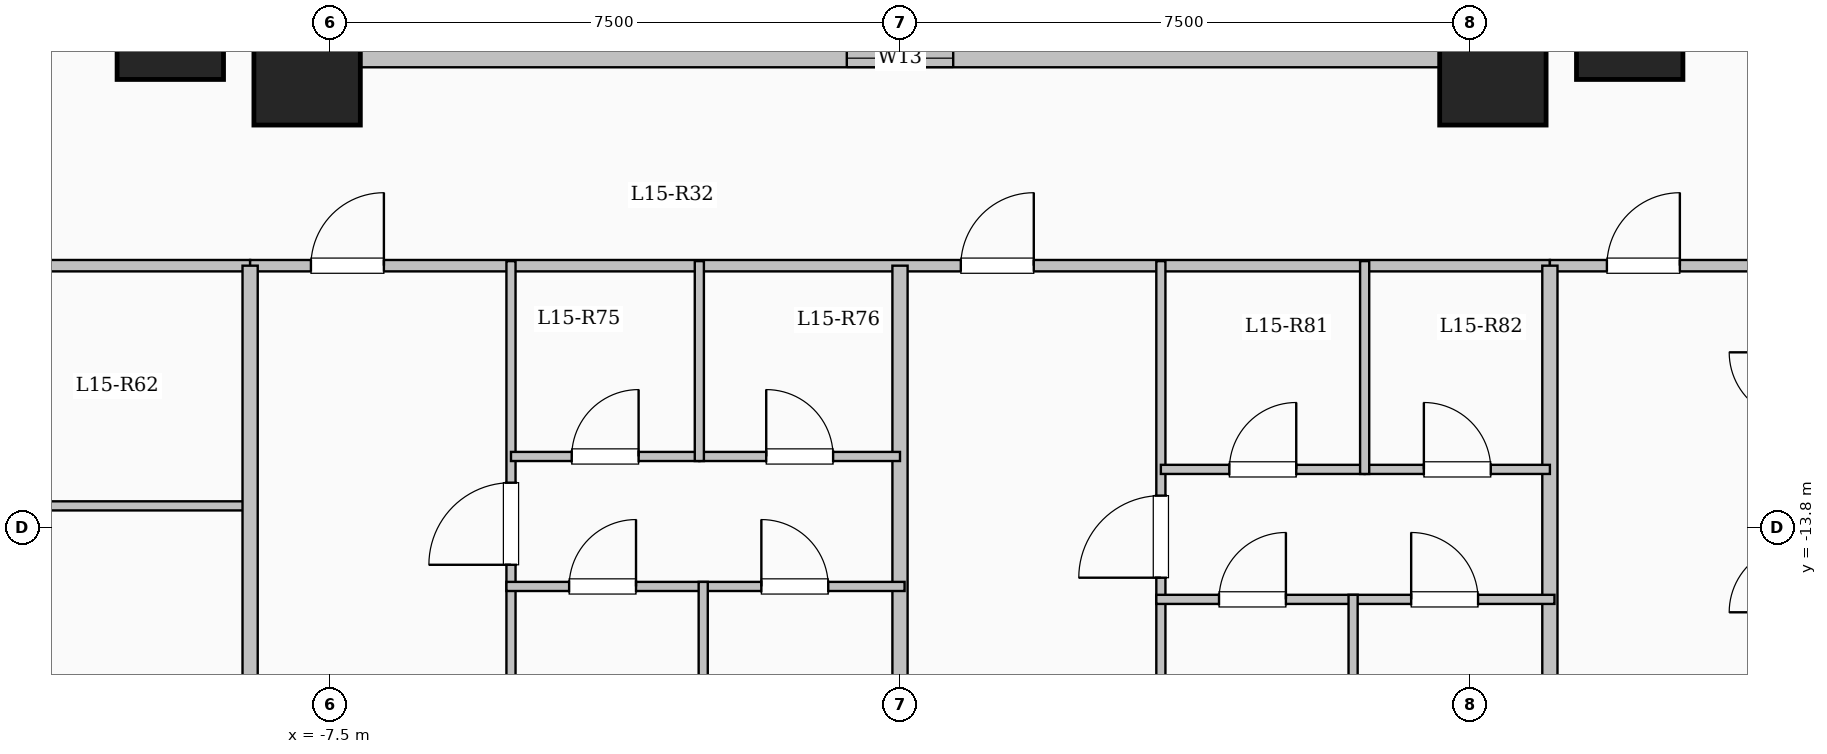
"""IFC4 building model, lengths in metres.
Left out: names, types, materials, properties, quantities, classifications, styles, units other than length and angle.
Written with IfcOpenShell. Run it as: python <this file> out.ifc"""

import sys

from ifc_helpers import new_model, si_unit, direction, frame, frame_2d, origin, origin_2d, place, context, subcontext, project, spatial, rectangle, extrude, element, fill, save


model = new_model("IFC4")
c1 = context("Model", 3, precision=1e-05, world=origin(), true_north=direction((0.0, 1.0)))
c2 = subcontext(c1, "Body", "Model", "MODEL_VIEW")
j1 = project(units=[si_unit("LENGTHUNIT", "METRE"), si_unit("PLANEANGLEUNIT", "RADIAN")], contexts=[c1])
p1 = place(None, origin())
s1 = spatial("IfcSite", under=j1, at=p1, CompositionType="ELEMENT")
p2 = place(p1, origin())
s2 = spatial("IfcBuilding", under=s1, at=p2, CompositionType="ELEMENT")
p3 = place(p2, frame((0.0, 0.0, 57.5)))
s3 = spatial("IfcBuildingStorey", under=s2, at=p3, CompositionType="ELEMENT", Elevation=57.5)
for number, where, z_axis, x_axis in (
    (1, (-7.8, -7.8, 0.0), (0.0, 0.0, 1.0), (1.0, 0.0, 0.0)),
    (2, (7.8, -7.8, 0.0), (0.0, 0.0, 1.0), (1.0, 0.0, 0.0)),
    (3, (-9.6, -7.2, 0.0), (0.0, 0.0, 1.0), (1.0, 0.0, 0.0)),
    (4, (9.6, -7.2, 0.0), (0.0, 0.0, 1.0), (1.0, 0.0, 0.0)),
):
    element("IfcColumn", number, at=place(p3, frame(where, z_axis=z_axis, x_axis=x_axis)), inside=s3, PredefinedType="COLUMN", context=c2, shape_type="SweptSolid", body=[
        extrude(rectangle(XDim=1.4, YDim=1.4, at=origin_2d()), origin(), (0.0, 0.0, 1.0), 3.35),
    ])
p4 = place(p3, frame((-7.62, -7.62, 0.0), z_axis=(0.0, 0.0, 1.0), x_axis=(1.0, 0.0, 0.0)))
e5 = element("IfcWall", 5, at=p4, inside=s3, PredefinedType="SOLIDWALL", context=c2, shape_type="SweptSolid", body=[
    extrude(rectangle(XDim=15.24, YDim=0.24, at=frame_2d((7.62, 0.0))), origin(), (0.0, 0.0, 1.0), 3.1),
])
p5 = place(p4, frame((6.92, 0.0, 0.95)))
e6 = element("IfcOpeningElement", 6, at=p5, cuts=e5, PredefinedType="OPENING", context=c2, shape_type="SweptSolid", body=[
    extrude(rectangle(XDim=1.4, YDim=1.5, at=frame_2d((0.7, 0.75))), frame((0.0, 0.13, 0.0), z_axis=(0.0, -1.0, 0.0), x_axis=(1.0, 0.0, 0.0)), (0.0, 0.0, 1.0), 0.26),
])
p6 = place(p3, frame((7.62, -7.62, 0.0), z_axis=(0.0, 0.0, 1.0), x_axis=(0.0, 1.0, 0.0)))
e7 = element("IfcWall", 7, at=p6, inside=s3, PredefinedType="SOLIDWALL", context=c2, shape_type="SweptSolid", body=[
    extrude(rectangle(XDim=15.24, YDim=0.24, at=frame_2d((7.62, 0.0))), origin(), (0.0, 0.0, 1.0), 3.1),
])
p7 = place(p6, frame((6.92, 0.0, 0.95)))
e8 = element("IfcOpeningElement", 8, at=p7, cuts=e7, PredefinedType="OPENING", context=c2, shape_type="SweptSolid", body=[
    extrude(rectangle(XDim=1.4, YDim=1.5, at=frame_2d((0.7, 0.75))), frame((0.0, 0.13, 0.0), z_axis=(0.0, -1.0, 0.0), x_axis=(1.0, 0.0, 0.0)), (0.0, 0.0, 1.0), 0.26),
])
p8 = place(p3, frame((-7.62, 7.62, 0.0), z_axis=(0.0, 0.0, 1.0), x_axis=(0.0, -1.0, 0.0)))
e9 = element("IfcWall", 9, at=p8, inside=s3, PredefinedType="SOLIDWALL", context=c2, shape_type="SweptSolid", body=[
    extrude(rectangle(XDim=15.24, YDim=0.24, at=frame_2d((7.62, 0.0))), origin(), (0.0, 0.0, 1.0), 3.1),
])
p9 = place(p8, frame((6.92, 0.0, 0.95)))
e10 = element("IfcOpeningElement", 10, at=p9, cuts=e9, PredefinedType="OPENING", context=c2, shape_type="SweptSolid", body=[
    extrude(rectangle(XDim=1.4, YDim=1.5, at=frame_2d((0.7, 0.75))), frame((0.0, 0.13, 0.0), z_axis=(0.0, -1.0, 0.0), x_axis=(1.0, 0.0, 0.0)), (0.0, 0.0, 1.0), 0.26),
])
p10 = place(p3, frame((-22.55, -10.35, 0.0), z_axis=(0.0, 0.0, 1.0), x_axis=(1.0, 0.0, 0.0)))
e11 = element("IfcWall", 11, at=p10, inside=s3, PredefinedType="PARTITIONING", context=c2, shape_type="SweptSolid", body=[
    extrude(rectangle(XDim=14.0, YDim=0.15, at=frame_2d((7.0, 0.0))), origin(), (0.0, 0.0, 1.0), 3.1),
])
p11 = place(p10, frame((0.7, 0.0, 0.0)))
e12 = element("IfcOpeningElement", 12, at=p11, cuts=e11, PredefinedType="OPENING", context=c2, shape_type="SweptSolid", body=[
    extrude(rectangle(XDim=0.96, YDim=2.15, at=frame_2d((0.48, 1.075))), frame((0.0, 0.085, 0.0), z_axis=(0.0, -1.0, 0.0), x_axis=(1.0, 0.0, 0.0)), (0.0, 0.0, 1.0), 0.17),
])
p12 = place(p10, frame((7.396, 0.0, 0.0)))
e13 = element("IfcOpeningElement", 13, at=p12, cuts=e11, PredefinedType="OPENING", context=c2, shape_type="SweptSolid", body=[
    extrude(rectangle(XDim=0.96, YDim=2.15, at=frame_2d((0.48, 1.075))), frame((0.0, 0.085, 0.0), z_axis=(0.0, -1.0, 0.0), x_axis=(1.0, 0.0, 0.0)), (0.0, 0.0, 1.0), 0.17),
])
p13 = place(p3, frame((-8.55, -10.35, 0.0), z_axis=(0.0, 0.0, 1.0), x_axis=(1.0, 0.0, 0.0)))
e14 = element("IfcWall", 14, at=p13, inside=s3, PredefinedType="PARTITIONING", context=c2, shape_type="SweptSolid", body=[
    extrude(rectangle(XDim=17.1, YDim=0.15, at=frame_2d((8.55, 0.0))), origin(), (0.0, 0.0, 1.0), 3.1),
])
p14 = place(p13, frame((0.8, 0.0, 0.0)))
e15 = element("IfcOpeningElement", 15, at=p14, cuts=e14, PredefinedType="OPENING", context=c2, shape_type="SweptSolid", body=[
    extrude(rectangle(XDim=0.96, YDim=2.15, at=frame_2d((0.48, 1.075))), frame((0.0, 0.085, 0.0), z_axis=(0.0, -1.0, 0.0), x_axis=(1.0, 0.0, 0.0)), (0.0, 0.0, 1.0), 0.17),
])
p15 = place(p13, frame((9.35, 0.0, 0.0)))
e16 = element("IfcOpeningElement", 16, at=p15, cuts=e14, PredefinedType="OPENING", context=c2, shape_type="SweptSolid", body=[
    extrude(rectangle(XDim=0.96, YDim=2.15, at=frame_2d((0.48, 1.075))), frame((0.0, 0.085, 0.0), z_axis=(0.0, -1.0, 0.0), x_axis=(1.0, 0.0, 0.0)), (0.0, 0.0, 1.0), 0.17),
])
p16 = place(p3, frame((8.55, -10.35, 0.0), z_axis=(0.0, 0.0, 1.0), x_axis=(1.0, 0.0, 0.0)))
e17 = element("IfcWall", 17, at=p16, inside=s3, PredefinedType="PARTITIONING", context=c2, shape_type="SweptSolid", body=[
    extrude(rectangle(XDim=14.0, YDim=0.15, at=frame_2d((7.0, 0.0))), origin(), (0.0, 0.0, 1.0), 3.1),
])
p17 = place(p16, frame((0.75, 0.0, 0.0)))
e18 = element("IfcOpeningElement", 18, at=p17, cuts=e17, PredefinedType="OPENING", context=c2, shape_type="SweptSolid", body=[
    extrude(rectangle(XDim=0.96, YDim=2.15, at=frame_2d((0.48, 1.075))), frame((0.0, 0.085, 0.0), z_axis=(0.0, -1.0, 0.0), x_axis=(1.0, 0.0, 0.0)), (0.0, 0.0, 1.0), 0.17),
])
p18 = place(p16, frame((6.888, 0.0, 0.0)))
e19 = element("IfcOpeningElement", 19, at=p18, cuts=e17, PredefinedType="OPENING", context=c2, shape_type="SweptSolid", body=[
    extrude(rectangle(XDim=0.96, YDim=2.15, at=frame_2d((0.48, 1.075))), frame((0.0, 0.085, 0.0), z_axis=(0.0, -1.0, 0.0), x_axis=(1.0, 0.0, 0.0)), (0.0, 0.0, 1.0), 0.17),
])
p19 = place(p3, frame((-12.144, -13.51, 0.0), z_axis=(0.0, 0.0, 1.0), x_axis=(1.0, 0.0, 0.0)))
e20 = element("IfcWall", 20, at=p19, inside=s3, PredefinedType="PARTITIONING", context=c2, shape_type="SweptSolid", body=[
    extrude(rectangle(XDim=3.604, YDim=0.12, at=frame_2d((1.802, 0.0))), origin(), (0.0, 0.0, 1.0), 3.1),
])
for number, where, z_axis, x_axis in (
    (21, (-8.55, -24.204, 0.0), (0.0, 0.0, 1.0), (0.0, 1.0, 0.0)),
    (22, (8.55, -24.204, 0.0), (0.0, 0.0, 1.0), (0.0, 1.0, 0.0)),
):
    element("IfcWall", number, at=place(p3, frame(where, z_axis=z_axis, x_axis=x_axis)), inside=s3, PredefinedType="SOLIDWALL", context=c2, shape_type="SweptSolid", body=[
        extrude(rectangle(XDim=13.854, YDim=0.2, at=frame_2d((6.927, 0.0))), origin(), (0.0, 0.0, 1.0), 3.1),
    ])
p20 = place(p3, frame((0.0, -25.08, 0.0), z_axis=(0.0, 0.0, 1.0), x_axis=(0.0, 1.0, 0.0)))
e23 = element("IfcWall", 23, at=p20, inside=s3, PredefinedType="SOLIDWALL", context=c2, shape_type="SweptSolid", body=[
    extrude(rectangle(XDim=14.73, YDim=0.2, at=frame_2d((7.365, 0.0))), origin(), (0.0, 0.0, 1.0), 3.1),
])
p21 = place(p3, frame((-5.118, -25.051, 0.0), z_axis=(0.0, 0.0, 1.0), x_axis=(0.0, 1.0, 0.0)))
e24 = element("IfcWall", 24, at=p21, inside=s3, PredefinedType="PARTITIONING", context=c2, shape_type="SweptSolid", body=[
    extrude(rectangle(XDim=14.761, YDim=0.12, at=frame_2d((7.38, 0.0))), origin(), (0.0, 0.0, 1.0), 3.1),
])
p22 = place(p21, frame((10.766, 0.0, 0.0)))
e25 = element("IfcOpeningElement", 25, at=p22, cuts=e24, PredefinedType="OPENING", context=c2, shape_type="SweptSolid", body=[
    extrude(rectangle(XDim=1.08, YDim=2.15, at=frame_2d((0.54, 1.075))), frame((0.0, 0.07, 0.0), z_axis=(0.0, -1.0, 0.0), x_axis=(1.0, 0.0, 0.0)), (0.0, 0.0, 1.0), 0.14),
])
p23 = place(p3, frame((-5.118, -12.86, 0.0), z_axis=(0.0, 0.0, 1.0), x_axis=(1.0, 0.0, 0.0)))
e26 = element("IfcWall", 26, at=p23, inside=s3, PredefinedType="PARTITIONING", context=c2, shape_type="SweptSolid", body=[
    extrude(rectangle(XDim=2.478, YDim=0.12, at=frame_2d((1.239, 0.0))), origin(), (0.0, 0.0, 1.0), 2.585),
])
p24 = place(p23, frame((0.799, 0.0, 0.0)))
e27 = element("IfcOpeningElement", 27, at=p24, cuts=e26, PredefinedType="OPENING", context=c2, shape_type="SweptSolid", body=[
    extrude(rectangle(XDim=0.88, YDim=2.1, at=frame_2d((0.44, 1.05))), frame((0.0, 0.07, 0.0), z_axis=(0.0, -1.0, 0.0), x_axis=(1.0, 0.0, 0.0)), (0.0, 0.0, 1.0), 0.14),
])
p25 = place(p3, frame((-2.64, -12.86, 0.0), z_axis=(0.0, 0.0, 1.0), x_axis=(1.0, 0.0, 0.0)))
e28 = element("IfcWall", 28, at=p25, inside=s3, PredefinedType="PARTITIONING", context=c2, shape_type="SweptSolid", body=[
    extrude(rectangle(XDim=2.64, YDim=0.12, at=frame_2d((1.32, 0.0))), origin(), (0.0, 0.0, 1.0), 2.585),
])
p26 = place(p25, frame((0.88, 0.0, 0.0)))
e29 = element("IfcOpeningElement", 29, at=p26, cuts=e28, PredefinedType="OPENING", context=c2, shape_type="SweptSolid", body=[
    extrude(rectangle(XDim=0.88, YDim=2.1, at=frame_2d((0.44, 1.05))), frame((0.0, 0.07, 0.0), z_axis=(0.0, -1.0, 0.0), x_axis=(1.0, 0.0, 0.0)), (0.0, 0.0, 1.0), 0.14),
])
p27 = place(p3, frame((-5.178, -14.57, 0.0), z_axis=(0.0, 0.0, 1.0), x_axis=(1.0, 0.0, 0.0)))
e30 = element("IfcWall", 30, at=p27, inside=s3, PredefinedType="PARTITIONING", context=c2, shape_type="SweptSolid", body=[
    extrude(rectangle(XDim=5.238, YDim=0.12, at=frame_2d((2.619, 0.0))), origin(), (0.0, 0.0, 1.0), 3.1),
])
p28 = place(p27, frame((0.825, 0.0, 0.0)))
e31 = element("IfcOpeningElement", 31, at=p28, cuts=e30, PredefinedType="OPENING", context=c2, shape_type="SweptSolid", body=[
    extrude(rectangle(XDim=0.88, YDim=2.1, at=frame_2d((0.44, 1.05))), frame((0.0, 0.07, 0.0), z_axis=(0.0, -1.0, 0.0), x_axis=(1.0, 0.0, 0.0)), (0.0, 0.0, 1.0), 0.14),
])
p29 = place(p27, frame((3.354, 0.0, 0.0)))
e32 = element("IfcOpeningElement", 32, at=p29, cuts=e30, PredefinedType="OPENING", context=c2, shape_type="SweptSolid", body=[
    extrude(rectangle(XDim=0.88, YDim=2.1, at=frame_2d((0.44, 1.05))), frame((0.0, 0.07, 0.0), z_axis=(0.0, -1.0, 0.0), x_axis=(1.0, 0.0, 0.0)), (0.0, 0.0, 1.0), 0.14),
])
p30 = place(p3, frame((-2.64, -12.92, 0.0), z_axis=(0.0, 0.0, 1.0), x_axis=(0.0, 1.0, 0.0)))
e33 = element("IfcWall", 33, at=p30, inside=s3, PredefinedType="PARTITIONING", context=c2, shape_type="SweptSolid", body=[
    extrude(rectangle(XDim=2.63, YDim=0.12, at=frame_2d((1.315, 0.0))), origin(), (0.0, 0.0, 1.0), 3.1),
])
p31 = place(p3, frame((-2.589, -25.08, 0.0), z_axis=(0.0, 0.0, 1.0), x_axis=(0.0, 1.0, 0.0)))
e34 = element("IfcWall", 34, at=p31, inside=s3, PredefinedType="PARTITIONING", context=c2, shape_type="SweptSolid", body=[
    extrude(rectangle(XDim=10.57, YDim=0.12, at=frame_2d((5.285, 0.0))), origin(), (0.0, 0.0, 1.0), 3.1),
])
p32 = place(p3, frame((3.432, -25.08, 0.0), z_axis=(0.0, 0.0, 1.0), x_axis=(0.0, 1.0, 0.0)))
e35 = element("IfcWall", 35, at=p32, inside=s3, PredefinedType="PARTITIONING", context=c2, shape_type="SweptSolid", body=[
    extrude(rectangle(XDim=14.79, YDim=0.12, at=frame_2d((7.395, 0.0))), origin(), (0.0, 0.0, 1.0), 3.1),
])
p33 = place(p32, frame((10.625, 0.0, 0.0)))
e36 = element("IfcOpeningElement", 36, at=p33, cuts=e35, PredefinedType="OPENING", context=c2, shape_type="SweptSolid", body=[
    extrude(rectangle(XDim=1.08, YDim=2.15, at=frame_2d((0.54, 1.075))), frame((0.0, 0.07, 0.0), z_axis=(0.0, -1.0, 0.0), x_axis=(1.0, 0.0, 0.0)), (0.0, 0.0, 1.0), 0.14),
])
p34 = place(p3, frame((3.432, -13.03, 0.0), z_axis=(0.0, 0.0, 1.0), x_axis=(1.0, 0.0, 0.0)))
e37 = element("IfcWall", 37, at=p34, inside=s3, PredefinedType="PARTITIONING", context=c2, shape_type="SweptSolid", body=[
    extrude(rectangle(XDim=2.681, YDim=0.12, at=frame_2d((1.341, 0.0))), origin(), (0.0, 0.0, 1.0), 2.585),
])
p35 = place(p34, frame((0.901, 0.0, 0.0)))
e38 = element("IfcOpeningElement", 38, at=p35, cuts=e37, PredefinedType="OPENING", context=c2, shape_type="SweptSolid", body=[
    extrude(rectangle(XDim=0.88, YDim=2.1, at=frame_2d((0.44, 1.05))), frame((0.0, 0.07, 0.0), z_axis=(0.0, -1.0, 0.0), x_axis=(1.0, 0.0, 0.0)), (0.0, 0.0, 1.0), 0.14),
])
p36 = place(p3, frame((6.113, -13.03, 0.0), z_axis=(0.0, 0.0, 1.0), x_axis=(1.0, 0.0, 0.0)))
e39 = element("IfcWall", 39, at=p36, inside=s3, PredefinedType="PARTITIONING", context=c2, shape_type="SweptSolid", body=[
    extrude(rectangle(XDim=2.437, YDim=0.12, at=frame_2d((1.219, 0.0))), origin(), (0.0, 0.0, 1.0), 2.585),
])
p37 = place(p36, frame((0.779, 0.0, 0.0)))
e40 = element("IfcOpeningElement", 40, at=p37, cuts=e39, PredefinedType="OPENING", context=c2, shape_type="SweptSolid", body=[
    extrude(rectangle(XDim=0.88, YDim=2.1, at=frame_2d((0.44, 1.05))), frame((0.0, 0.07, 0.0), z_axis=(0.0, -1.0, 0.0), x_axis=(1.0, 0.0, 0.0)), (0.0, 0.0, 1.0), 0.14),
])
p38 = place(p3, frame((3.372, -14.74, 0.0), z_axis=(0.0, 0.0, 1.0), x_axis=(1.0, 0.0, 0.0)))
e41 = element("IfcWall", 41, at=p38, inside=s3, PredefinedType="PARTITIONING", context=c2, shape_type="SweptSolid", body=[
    extrude(rectangle(XDim=5.238, YDim=0.12, at=frame_2d((2.619, 0.0))), origin(), (0.0, 0.0, 1.0), 2.585),
])
p39 = place(p38, frame((0.825, 0.0, 0.0)))
e42 = element("IfcOpeningElement", 42, at=p39, cuts=e41, PredefinedType="OPENING", context=c2, shape_type="SweptSolid", body=[
    extrude(rectangle(XDim=0.88, YDim=2.1, at=frame_2d((0.44, 1.05))), frame((0.0, 0.07, 0.0), z_axis=(0.0, -1.0, 0.0), x_axis=(1.0, 0.0, 0.0)), (0.0, 0.0, 1.0), 0.14),
])
p40 = place(p38, frame((3.353, 0.0, 0.0)))
e43 = element("IfcOpeningElement", 43, at=p40, cuts=e41, PredefinedType="OPENING", context=c2, shape_type="SweptSolid", body=[
    extrude(rectangle(XDim=0.88, YDim=2.1, at=frame_2d((0.44, 1.05))), frame((0.0, 0.07, 0.0), z_axis=(0.0, -1.0, 0.0), x_axis=(1.0, 0.0, 0.0)), (0.0, 0.0, 1.0), 0.14),
])
p41 = place(p3, frame((6.113, -13.09, 0.0), z_axis=(0.0, 0.0, 1.0), x_axis=(0.0, 1.0, 0.0)))
e44 = element("IfcWall", 44, at=p41, inside=s3, PredefinedType="PARTITIONING", context=c2, shape_type="SweptSolid", body=[
    extrude(rectangle(XDim=2.8, YDim=0.12, at=frame_2d((1.4, 0.0))), origin(), (0.0, 0.0, 1.0), 3.1),
])
p42 = place(p3, frame((5.961, -24.843, 0.0), z_axis=(0.0, 0.0, 1.0), x_axis=(0.0, 1.0, 0.0)))
e45 = element("IfcWall", 45, at=p42, inside=s3, PredefinedType="PARTITIONING", context=c2, shape_type="SweptSolid", body=[
    extrude(rectangle(XDim=10.163, YDim=0.12, at=frame_2d((5.082, 0.0))), origin(), (0.0, 0.0, 1.0), 3.1),
])
p43 = place(p5, origin())
e46 = element("IfcWindow", 46, at=p43, inside=s3, PartitioningType="SINGLE_PANEL", PredefinedType="WINDOW", context=c2, shape_type="SweptSolid", body=[
    extrude(rectangle(XDim=1.4, YDim=1.5, at=frame_2d((0.7, 0.75))), frame((0.0, 0.03, 0.0), z_axis=(0.0, -1.0, 0.0), x_axis=(1.0, 0.0, 0.0)), (0.0, 0.0, 1.0), 0.06),
])
fill(e6, e46)
p44 = place(p17, origin())
e47 = element("IfcDoor", 47, at=p44, inside=s3, OperationType="SINGLE_SWING_RIGHT", PredefinedType="DOOR", context=c2, shape_type="SweptSolid", body=[
    extrude(rectangle(XDim=0.96, YDim=2.15, at=frame_2d((0.48, 1.075))), frame((0.0, 0.025, 0.0), z_axis=(0.0, -1.0, 0.0), x_axis=(1.0, 0.0, 0.0)), (0.0, 0.0, 1.0), 0.05),
])
fill(e18, e47)
p45 = place(p14, origin())
e48 = element("IfcDoor", 48, at=p45, inside=s3, OperationType="SINGLE_SWING_RIGHT", PredefinedType="DOOR", context=c2, shape_type="SweptSolid", body=[
    extrude(rectangle(XDim=0.96, YDim=2.15, at=frame_2d((0.48, 1.075))), frame((0.0, 0.025, 0.0), z_axis=(0.0, -1.0, 0.0), x_axis=(1.0, 0.0, 0.0)), (0.0, 0.0, 1.0), 0.05),
])
fill(e15, e48)
p46 = place(p22, origin())
e49 = element("IfcDoor", 49, at=p46, inside=s3, OperationType="SINGLE_SWING_LEFT", PredefinedType="DOOR", context=c2, shape_type="SweptSolid", body=[
    extrude(rectangle(XDim=1.08, YDim=2.15, at=frame_2d((0.54, 1.075))), frame((0.0, 0.025, 0.0), z_axis=(0.0, -1.0, 0.0), x_axis=(1.0, 0.0, 0.0)), (0.0, 0.0, 1.0), 0.05),
])
fill(e25, e49)
p47 = place(p24, origin())
e50 = element("IfcDoor", 50, at=p47, inside=s3, OperationType="SINGLE_SWING_RIGHT", PredefinedType="DOOR", context=c2, shape_type="SweptSolid", body=[
    extrude(rectangle(XDim=0.88, YDim=2.1, at=frame_2d((0.44, 1.05))), frame((0.0, 0.025, 0.0), z_axis=(0.0, -1.0, 0.0), x_axis=(1.0, 0.0, 0.0)), (0.0, 0.0, 1.0), 0.05),
])
fill(e27, e50)
p48 = place(p26, origin())
e51 = element("IfcDoor", 51, at=p48, inside=s3, OperationType="SINGLE_SWING_LEFT", PredefinedType="DOOR", context=c2, shape_type="SweptSolid", body=[
    extrude(rectangle(XDim=0.88, YDim=2.1, at=frame_2d((0.44, 1.05))), frame((0.0, 0.025, 0.0), z_axis=(0.0, -1.0, 0.0), x_axis=(1.0, 0.0, 0.0)), (0.0, 0.0, 1.0), 0.05),
])
fill(e29, e51)
p49 = place(p28, origin())
e52 = element("IfcDoor", 52, at=p49, inside=s3, OperationType="SINGLE_SWING_RIGHT", PredefinedType="DOOR", context=c2, shape_type="SweptSolid", body=[
    extrude(rectangle(XDim=0.88, YDim=2.1, at=frame_2d((0.44, 1.05))), frame((0.0, 0.025, 0.0), z_axis=(0.0, -1.0, 0.0), x_axis=(1.0, 0.0, 0.0)), (0.0, 0.0, 1.0), 0.05),
])
fill(e31, e52)
p50 = place(p29, origin())
e53 = element("IfcDoor", 53, at=p50, inside=s3, OperationType="SINGLE_SWING_LEFT", PredefinedType="DOOR", context=c2, shape_type="SweptSolid", body=[
    extrude(rectangle(XDim=0.88, YDim=2.1, at=frame_2d((0.44, 1.05))), frame((0.0, 0.025, 0.0), z_axis=(0.0, -1.0, 0.0), x_axis=(1.0, 0.0, 0.0)), (0.0, 0.0, 1.0), 0.05),
])
fill(e32, e53)
p51 = place(p15, origin())
e54 = element("IfcDoor", 54, at=p51, inside=s3, OperationType="SINGLE_SWING_RIGHT", PredefinedType="DOOR", context=c2, shape_type="SweptSolid", body=[
    extrude(rectangle(XDim=0.96, YDim=2.15, at=frame_2d((0.48, 1.075))), frame((0.0, 0.025, 0.0), z_axis=(0.0, -1.0, 0.0), x_axis=(1.0, 0.0, 0.0)), (0.0, 0.0, 1.0), 0.05),
])
fill(e16, e54)
p52 = place(p33, origin())
e55 = element("IfcDoor", 55, at=p52, inside=s3, OperationType="SINGLE_SWING_LEFT", PredefinedType="DOOR", context=c2, shape_type="SweptSolid", body=[
    extrude(rectangle(XDim=1.08, YDim=2.15, at=frame_2d((0.54, 1.075))), frame((0.0, 0.025, 0.0), z_axis=(0.0, -1.0, 0.0), x_axis=(1.0, 0.0, 0.0)), (0.0, 0.0, 1.0), 0.05),
])
fill(e36, e55)
p53 = place(p35, origin())
e56 = element("IfcDoor", 56, at=p53, inside=s3, OperationType="SINGLE_SWING_RIGHT", PredefinedType="DOOR", context=c2, shape_type="SweptSolid", body=[
    extrude(rectangle(XDim=0.88, YDim=2.1, at=frame_2d((0.44, 1.05))), frame((0.0, 0.025, 0.0), z_axis=(0.0, -1.0, 0.0), x_axis=(1.0, 0.0, 0.0)), (0.0, 0.0, 1.0), 0.05),
])
fill(e38, e56)
p54 = place(p37, origin())
e57 = element("IfcDoor", 57, at=p54, inside=s3, OperationType="SINGLE_SWING_LEFT", PredefinedType="DOOR", context=c2, shape_type="SweptSolid", body=[
    extrude(rectangle(XDim=0.88, YDim=2.1, at=frame_2d((0.44, 1.05))), frame((0.0, 0.025, 0.0), z_axis=(0.0, -1.0, 0.0), x_axis=(1.0, 0.0, 0.0)), (0.0, 0.0, 1.0), 0.05),
])
fill(e40, e57)
p55 = place(p39, origin())
e58 = element("IfcDoor", 58, at=p55, inside=s3, OperationType="SINGLE_SWING_RIGHT", PredefinedType="DOOR", context=c2, shape_type="SweptSolid", body=[
    extrude(rectangle(XDim=0.88, YDim=2.1, at=frame_2d((0.44, 1.05))), frame((0.0, 0.025, 0.0), z_axis=(0.0, -1.0, 0.0), x_axis=(1.0, 0.0, 0.0)), (0.0, 0.0, 1.0), 0.05),
])
fill(e42, e58)
p56 = place(p40, origin())
e59 = element("IfcDoor", 59, at=p56, inside=s3, OperationType="SINGLE_SWING_LEFT", PredefinedType="DOOR", context=c2, shape_type="SweptSolid", body=[
    extrude(rectangle(XDim=0.88, YDim=2.1, at=frame_2d((0.44, 1.05))), frame((0.0, 0.025, 0.0), z_axis=(0.0, -1.0, 0.0), x_axis=(1.0, 0.0, 0.0)), (0.0, 0.0, 1.0), 0.05),
])
fill(e43, e59)
save(model, sys.argv[1])
